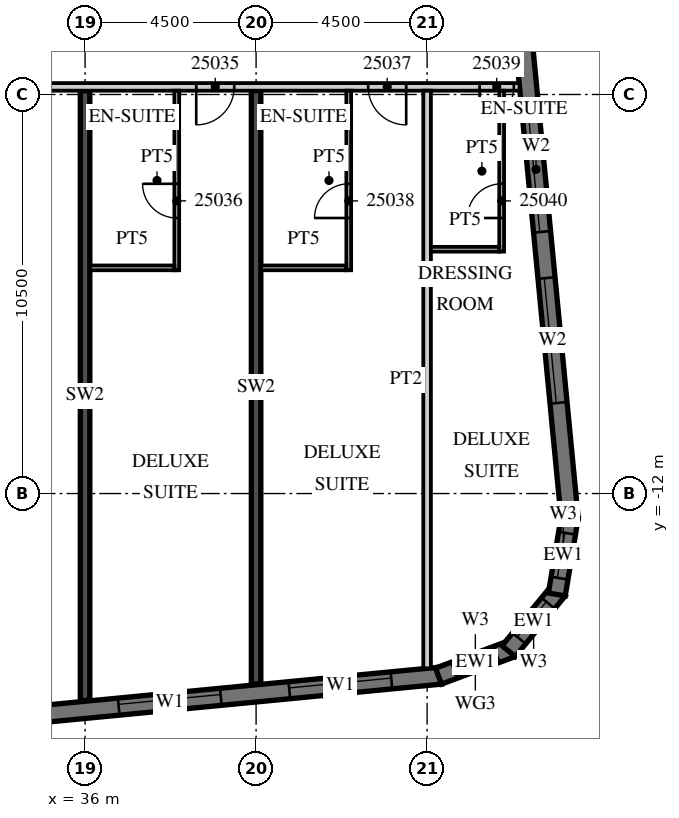
"""IFC4 building model, lengths in metres.
Left out: names, types, materials, properties, quantities, classifications, styles, units other than length and angle.
Written with IfcOpenShell. Run it as: python <this file> out.ifc"""

import sys

from ifc_helpers import new_model, si_unit, direction, frame, frame_2d, origin, place, context, subcontext, project, spatial, polyline, rectangle, outline, extrude, element, fill, save


model = new_model("IFC4")
c1 = context("Model", 3, precision=1e-05, world=origin(), true_north=direction((0.0, 1.0)))
c2 = subcontext(c1, "Body", "Model", "MODEL_VIEW")
j1 = project(units=[si_unit("LENGTHUNIT", "METRE"), si_unit("PLANEANGLEUNIT", "RADIAN")], contexts=[c1])
p1 = place(None, origin())
s1 = spatial("IfcSite", under=j1, at=p1, CompositionType="ELEMENT")
p2 = place(p1, origin())
s2 = spatial("IfcBuilding", under=s1, at=p2, CompositionType="ELEMENT")
p3 = place(p2, frame((0.0, 0.0, 117.4)))
s3 = spatial("IfcBuildingStorey", under=s2, at=p3, CompositionType="ELEMENT", Elevation=117.4)
p4 = place(p3, frame((36.0, -17.444, 0.0), z_axis=(0.0, 0.0, 1.0), x_axis=(0.0, 1.0, 0.0)))
e1 = element("IfcWall", 1, at=p4, inside=s3, PredefinedType="SHEAR", context=c2, shape_type="SweptSolid", body=[
    extrude(rectangle(XDim=16.044, YDim=0.25, at=frame_2d((8.022, 0.0))), origin(), (0.0, 0.0, 1.0), 3.3),
])
p5 = place(p3, frame((40.5, -17.011, 0.0), z_axis=(0.0, 0.0, 1.0), x_axis=(0.0, 1.0, 0.0)))
e2 = element("IfcWall", 2, at=p5, inside=s3, PredefinedType="SHEAR", context=c2, shape_type="SweptSolid", body=[
    extrude(rectangle(XDim=15.611, YDim=0.25, at=frame_2d((7.805, 0.0))), origin(), (0.0, 0.0, 1.0), 3.3),
])
p6 = place(p3, frame((-13.521, -22.46, 0.0), z_axis=(0.0, 0.0, 1.0), x_axis=(0.995396096335, 0.095846812164, 0.0)))
e3 = element("IfcWall", 3, at=p6, inside=s3, PredefinedType="SOLIDWALL", context=c2, shape_type="SweptSolid", body=[
    extrude(rectangle(XDim=59.151, YDim=0.45, at=frame_2d((29.575, 0.0))), origin(), (0.0, 0.0, 1.0), 3.02),
])
p7 = place(p6, frame((0.91, 0.0, 0.45)))
e4 = element("IfcOpeningElement", 4, at=p7, cuts=e3, PredefinedType="OPENING", context=c2, shape_type="SweptSolid", body=[
    extrude(rectangle(XDim=2.7, YDim=2.25, at=frame_2d((1.35, 1.125))), frame((0.0, 0.235, 0.0), z_axis=(0.0, -1.0, 0.0), x_axis=(1.0, 0.0, 0.0)), (0.0, 0.0, 1.0), 0.47),
])
p8 = place(p6, frame((5.431, 0.0, 0.45)))
e5 = element("IfcOpeningElement", 5, at=p8, cuts=e3, PredefinedType="OPENING", context=c2, shape_type="SweptSolid", body=[
    extrude(rectangle(XDim=2.7, YDim=2.25, at=frame_2d((1.35, 1.125))), frame((0.0, 0.235, 0.0), z_axis=(0.0, -1.0, 0.0), x_axis=(1.0, 0.0, 0.0)), (0.0, 0.0, 1.0), 0.47),
])
p9 = place(p6, frame((9.952, 0.0, 0.45)))
e6 = element("IfcOpeningElement", 6, at=p9, cuts=e3, PredefinedType="OPENING", context=c2, shape_type="SweptSolid", body=[
    extrude(rectangle(XDim=2.7, YDim=2.25, at=frame_2d((1.35, 1.125))), frame((0.0, 0.235, 0.0), z_axis=(0.0, -1.0, 0.0), x_axis=(1.0, 0.0, 0.0)), (0.0, 0.0, 1.0), 0.47),
])
p10 = place(p6, frame((14.473, 0.0, 0.45)))
e7 = element("IfcOpeningElement", 7, at=p10, cuts=e3, PredefinedType="OPENING", context=c2, shape_type="SweptSolid", body=[
    extrude(rectangle(XDim=2.7, YDim=2.25, at=frame_2d((1.35, 1.125))), frame((0.0, 0.235, 0.0), z_axis=(0.0, -1.0, 0.0), x_axis=(1.0, 0.0, 0.0)), (0.0, 0.0, 1.0), 0.47),
])
p11 = place(p6, frame((18.994, 0.0, 0.45)))
e8 = element("IfcOpeningElement", 8, at=p11, cuts=e3, PredefinedType="OPENING", context=c2, shape_type="SweptSolid", body=[
    extrude(rectangle(XDim=2.7, YDim=2.25, at=frame_2d((1.35, 1.125))), frame((0.0, 0.235, 0.0), z_axis=(0.0, -1.0, 0.0), x_axis=(1.0, 0.0, 0.0)), (0.0, 0.0, 1.0), 0.47),
])
p12 = place(p6, frame((23.514, 0.0, 0.45)))
e9 = element("IfcOpeningElement", 9, at=p12, cuts=e3, PredefinedType="OPENING", context=c2, shape_type="SweptSolid", body=[
    extrude(rectangle(XDim=2.7, YDim=2.25, at=frame_2d((1.35, 1.125))), frame((0.0, 0.235, 0.0), z_axis=(0.0, -1.0, 0.0), x_axis=(1.0, 0.0, 0.0)), (0.0, 0.0, 1.0), 0.47),
])
p13 = place(p6, frame((28.035, 0.0, 0.45)))
e10 = element("IfcOpeningElement", 10, at=p13, cuts=e3, PredefinedType="OPENING", context=c2, shape_type="SweptSolid", body=[
    extrude(rectangle(XDim=2.7, YDim=2.25, at=frame_2d((1.35, 1.125))), frame((0.0, 0.235, 0.0), z_axis=(0.0, -1.0, 0.0), x_axis=(1.0, 0.0, 0.0)), (0.0, 0.0, 1.0), 0.47),
])
p14 = place(p6, frame((32.556, 0.0, 0.45)))
e11 = element("IfcOpeningElement", 11, at=p14, cuts=e3, PredefinedType="OPENING", context=c2, shape_type="SweptSolid", body=[
    extrude(rectangle(XDim=2.7, YDim=2.25, at=frame_2d((1.35, 1.125))), frame((0.0, 0.235, 0.0), z_axis=(0.0, -1.0, 0.0), x_axis=(1.0, 0.0, 0.0)), (0.0, 0.0, 1.0), 0.47),
])
p15 = place(p6, frame((37.077, 0.0, 0.45)))
e12 = element("IfcOpeningElement", 12, at=p15, cuts=e3, PredefinedType="OPENING", context=c2, shape_type="SweptSolid", body=[
    extrude(rectangle(XDim=2.7, YDim=2.25, at=frame_2d((1.35, 1.125))), frame((0.0, 0.235, 0.0), z_axis=(0.0, -1.0, 0.0), x_axis=(1.0, 0.0, 0.0)), (0.0, 0.0, 1.0), 0.47),
])
p16 = place(p6, frame((41.598, 0.0, 0.45)))
e13 = element("IfcOpeningElement", 13, at=p16, cuts=e3, PredefinedType="OPENING", context=c2, shape_type="SweptSolid", body=[
    extrude(rectangle(XDim=2.7, YDim=2.25, at=frame_2d((1.35, 1.125))), frame((0.0, 0.235, 0.0), z_axis=(0.0, -1.0, 0.0), x_axis=(1.0, 0.0, 0.0)), (0.0, 0.0, 1.0), 0.47),
])
p17 = place(p6, frame((46.118, 0.0, 0.45)))
e14 = element("IfcOpeningElement", 14, at=p17, cuts=e3, PredefinedType="OPENING", context=c2, shape_type="SweptSolid", body=[
    extrude(rectangle(XDim=2.7, YDim=2.25, at=frame_2d((1.35, 1.125))), frame((0.0, 0.235, 0.0), z_axis=(0.0, -1.0, 0.0), x_axis=(1.0, 0.0, 0.0)), (0.0, 0.0, 1.0), 0.47),
])
p18 = place(p6, frame((50.639, 0.0, 0.45)))
e15 = element("IfcOpeningElement", 15, at=p18, cuts=e3, PredefinedType="OPENING", context=c2, shape_type="SweptSolid", body=[
    extrude(rectangle(XDim=2.7, YDim=2.25, at=frame_2d((1.35, 1.125))), frame((0.0, 0.235, 0.0), z_axis=(0.0, -1.0, 0.0), x_axis=(1.0, 0.0, 0.0)), (0.0, 0.0, 1.0), 0.47),
])
p19 = place(p6, frame((55.15, 0.0, 0.45)))
e16 = element("IfcOpeningElement", 16, at=p19, cuts=e3, PredefinedType="OPENING", context=c2, shape_type="SweptSolid", body=[
    extrude(rectangle(XDim=2.7, YDim=2.25, at=frame_2d((1.35, 1.125))), frame((0.0, 0.235, 0.0), z_axis=(0.0, -1.0, 0.0), x_axis=(1.0, 0.0, 0.0)), (0.0, 0.0, 1.0), 0.47),
])
p20 = place(p3, frame((45.3, -16.804, 0.0), z_axis=(0.0, 0.0, 1.0), x_axis=(0.936677599948, 0.350192909346, 0.0)))
e17 = element("IfcWall", 17, at=p20, inside=s3, PredefinedType="SOLIDWALL", context=c2, shape_type="SweptSolid", body=[
    extrude(outline(polyline([(0.0, -0.225), (2.071, -0.225), (1.95, 0.225), (0.121, 0.225), (0.0, -0.225)])), origin(), (0.0, 0.0, 1.0), 3.02),
])
p21 = place(p20, frame((0.435, 0.0, 0.45)))
e18 = element("IfcOpeningElement", 18, at=p21, cuts=e17, PredefinedType="OPENING", context=c2, shape_type="SweptSolid", body=[
    extrude(rectangle(XDim=1.2, YDim=2.25, at=frame_2d((0.6, 1.125))), frame((0.0, 0.235, 0.0), z_axis=(0.0, -1.0, 0.0), x_axis=(1.0, 0.0, 0.0)), (0.0, 0.0, 1.0), 0.47),
])
p22 = place(p3, frame((47.145, -16.147, 0.0), z_axis=(0.0, 0.0, 1.0), x_axis=(0.635988241739, 0.771698747161, 0.0)))
e19 = element("IfcWall", 19, at=p22, inside=s3, PredefinedType="SOLIDWALL", context=c2, shape_type="SweptSolid", body=[
    extrude(outline(polyline([(0.0, -0.225), (2.071, -0.225), (1.95, 0.225), (0.121, 0.225), (0.0, -0.225)])), origin(), (0.0, 0.0, 1.0), 3.02),
])
p23 = place(p22, frame((0.435, 0.0, 0.45)))
e20 = element("IfcOpeningElement", 20, at=p23, cuts=e19, PredefinedType="OPENING", context=c2, shape_type="SweptSolid", body=[
    extrude(rectangle(XDim=1.2, YDim=2.25, at=frame_2d((0.6, 1.125))), frame((0.0, 0.235, 0.0), z_axis=(0.0, -1.0, 0.0), x_axis=(1.0, 0.0, 0.0)), (0.0, 0.0, 1.0), 0.47),
])
p24 = place(p3, frame((48.413, -14.655, 0.0), z_axis=(0.0, 0.0, 1.0), x_axis=(0.165068144653, 0.986282164302, 0.0)))
e21 = element("IfcWall", 21, at=p24, inside=s3, PredefinedType="SOLIDWALL", context=c2, shape_type="SweptSolid", body=[
    extrude(outline(polyline([(0.0, -0.225), (2.071, -0.225), (1.95, 0.225), (0.121, 0.225), (0.0, -0.225)])), origin(), (0.0, 0.0, 1.0), 3.02),
])
p25 = place(p24, frame((0.435, 0.0, 0.45)))
e22 = element("IfcOpeningElement", 22, at=p25, cuts=e21, PredefinedType="OPENING", context=c2, shape_type="SweptSolid", body=[
    extrude(rectangle(XDim=1.2, YDim=2.25, at=frame_2d((0.6, 1.125))), frame((0.0, 0.235, 0.0), z_axis=(0.0, -1.0, 0.0), x_axis=(1.0, 0.0, 0.0)), (0.0, 0.0, 1.0), 0.47),
])
p26 = place(p3, frame((48.753, -12.672, 0.0), z_axis=(0.0, 0.0, 1.0), x_axis=(-0.095842661909, 0.995396495954, 0.0)))
e23 = element("IfcWall", 23, at=p26, inside=s3, PredefinedType="SOLIDWALL", context=c2, shape_type="SweptSolid", body=[
    extrude(rectangle(XDim=35.0, YDim=0.45, at=frame_2d((17.5, 0.0))), origin(), (0.0, 0.0, 1.0), 3.02),
])
p27 = place(p26, frame((3.072, 0.0, 0.45)))
e24 = element("IfcOpeningElement", 24, at=p27, cuts=e23, PredefinedType="OPENING", context=c2, shape_type="SweptSolid", body=[
    extrude(rectangle(XDim=3.3, YDim=2.25, at=frame_2d((1.65, 1.125))), frame((0.0, 0.235, 0.0), z_axis=(0.0, -1.0, 0.0), x_axis=(1.0, 0.0, 0.0)), (0.0, 0.0, 1.0), 0.47),
])
p28 = place(p26, frame((7.593, 0.0, 0.45)))
e25 = element("IfcOpeningElement", 25, at=p28, cuts=e23, PredefinedType="OPENING", context=c2, shape_type="SweptSolid", body=[
    extrude(rectangle(XDim=3.3, YDim=2.25, at=frame_2d((1.65, 1.125))), frame((0.0, 0.235, 0.0), z_axis=(0.0, -1.0, 0.0), x_axis=(1.0, 0.0, 0.0)), (0.0, 0.0, 1.0), 0.47),
])
p29 = place(p3, frame((-13.5, -1.3, 0.0), z_axis=(0.0, 0.0, 1.0), x_axis=(1.0, 0.0, 0.0)))
e26 = element("IfcWall", 26, at=p29, inside=s3, PredefinedType="PARTITIONING", context=c2, shape_type="SweptSolid", body=[
    extrude(rectangle(XDim=60.932, YDim=0.2, at=frame_2d((30.466, 0.0))), origin(), (0.0, 0.0, 1.0), 3.02),
])
p30 = place(p29, frame((0.575, 0.0, 0.0)))
e27 = element("IfcOpeningElement", 27, at=p30, cuts=e26, PredefinedType="OPENING", context=c2, shape_type="SweptSolid", body=[
    extrude(rectangle(XDim=1.0, YDim=2.1, at=frame_2d((0.5, 1.05))), frame((0.0, 0.11, 0.0), z_axis=(0.0, -1.0, 0.0), x_axis=(1.0, 0.0, 0.0)), (0.0, 0.0, 1.0), 0.22),
])
p31 = place(p29, frame((5.075, 0.0, 0.0)))
e28 = element("IfcOpeningElement", 28, at=p31, cuts=e26, PredefinedType="OPENING", context=c2, shape_type="SweptSolid", body=[
    extrude(rectangle(XDim=1.0, YDim=2.1, at=frame_2d((0.5, 1.05))), frame((0.0, 0.11, 0.0), z_axis=(0.0, -1.0, 0.0), x_axis=(1.0, 0.0, 0.0)), (0.0, 0.0, 1.0), 0.22),
])
p32 = place(p29, frame((11.925, 0.0, 0.0)))
e29 = element("IfcOpeningElement", 29, at=p32, cuts=e26, PredefinedType="OPENING", context=c2, shape_type="SweptSolid", body=[
    extrude(rectangle(XDim=1.0, YDim=2.1, at=frame_2d((0.5, 1.05))), frame((0.0, 0.11, 0.0), z_axis=(0.0, -1.0, 0.0), x_axis=(1.0, 0.0, 0.0)), (0.0, 0.0, 1.0), 0.22),
])
p33 = place(p29, frame((15.938, 0.0, 0.0)))
e30 = element("IfcOpeningElement", 30, at=p33, cuts=e26, PredefinedType="OPENING", context=c2, shape_type="SweptSolid", body=[
    extrude(rectangle(XDim=1.2, YDim=2.1, at=frame_2d((0.6, 1.05))), frame((0.0, 0.11, 0.0), z_axis=(0.0, -1.0, 0.0), x_axis=(1.0, 0.0, 0.0)), (0.0, 0.0, 1.0), 0.22),
])
p34 = place(p29, frame((25.45, 0.0, 0.0)))
e31 = element("IfcOpeningElement", 31, at=p34, cuts=e26, PredefinedType="OPENING", context=c2, shape_type="SweptSolid", body=[
    extrude(rectangle(XDim=1.0, YDim=2.1, at=frame_2d((0.5, 1.05))), frame((0.0, 0.11, 0.0), z_axis=(0.0, -1.0, 0.0), x_axis=(1.0, 0.0, 0.0)), (0.0, 0.0, 1.0), 0.22),
])
p35 = place(p29, frame((27.55, 0.0, 0.0)))
e32 = element("IfcOpeningElement", 32, at=p35, cuts=e26, PredefinedType="OPENING", context=c2, shape_type="SweptSolid", body=[
    extrude(rectangle(XDim=1.0, YDim=2.1, at=frame_2d((0.5, 1.05))), frame((0.0, 0.11, 0.0), z_axis=(0.0, -1.0, 0.0), x_axis=(1.0, 0.0, 0.0)), (0.0, 0.0, 1.0), 0.22),
])
p36 = place(p29, frame((33.938, 0.0, 0.0)))
e33 = element("IfcOpeningElement", 33, at=p36, cuts=e26, PredefinedType="OPENING", context=c2, shape_type="SweptSolid", body=[
    extrude(rectangle(XDim=1.2, YDim=2.1, at=frame_2d((0.6, 1.05))), frame((0.0, 0.11, 0.0), z_axis=(0.0, -1.0, 0.0), x_axis=(1.0, 0.0, 0.0)), (0.0, 0.0, 1.0), 0.22),
])
p37 = place(p29, frame((45.862, 0.0, 0.0)))
e34 = element("IfcOpeningElement", 34, at=p37, cuts=e26, PredefinedType="OPENING", context=c2, shape_type="SweptSolid", body=[
    extrude(rectangle(XDim=1.2, YDim=2.1, at=frame_2d((0.6, 1.05))), frame((0.0, 0.11, 0.0), z_axis=(0.0, -1.0, 0.0), x_axis=(1.0, 0.0, 0.0)), (0.0, 0.0, 1.0), 0.22),
])
p38 = place(p29, frame((52.425, 0.0, 0.0)))
e35 = element("IfcOpeningElement", 35, at=p38, cuts=e26, PredefinedType="OPENING", context=c2, shape_type="SweptSolid", body=[
    extrude(rectangle(XDim=1.0, YDim=2.1, at=frame_2d((0.5, 1.05))), frame((0.0, 0.11, 0.0), z_axis=(0.0, -1.0, 0.0), x_axis=(1.0, 0.0, 0.0)), (0.0, 0.0, 1.0), 0.22),
])
p39 = place(p29, frame((56.95, 0.0, 0.0)))
e36 = element("IfcOpeningElement", 36, at=p39, cuts=e26, PredefinedType="OPENING", context=c2, shape_type="SweptSolid", body=[
    extrude(rectangle(XDim=1.0, YDim=2.1, at=frame_2d((0.5, 1.05))), frame((0.0, 0.11, 0.0), z_axis=(0.0, -1.0, 0.0), x_axis=(1.0, 0.0, 0.0)), (0.0, 0.0, 1.0), 0.22),
])
p40 = place(p29, frame((59.882, 0.0, 0.0)))
e37 = element("IfcOpeningElement", 37, at=p40, cuts=e26, PredefinedType="OPENING", context=c2, shape_type="SweptSolid", body=[
    extrude(rectangle(XDim=0.9, YDim=2.1, at=frame_2d((0.45, 1.05))), frame((0.0, 0.11, 0.0), z_axis=(0.0, -1.0, 0.0), x_axis=(1.0, 0.0, 0.0)), (0.0, 0.0, 1.0), 0.22),
])
p41 = place(p3, frame((38.413, -6.125, 0.0), z_axis=(0.0, 0.0, 1.0), x_axis=(0.0, 1.0, 0.0)))
e38 = element("IfcWall", 38, at=p41, inside=s3, PredefinedType="PARTITIONING", context=c2, shape_type="SweptSolid", body=[
    extrude(rectangle(XDim=4.725, YDim=0.125, at=frame_2d((2.363, 0.0))), origin(), (0.0, 0.0, 1.0), 3.02),
])
p42 = place(p41, frame((1.375, 0.0, 0.0)))
e39 = element("IfcOpeningElement", 39, at=p42, cuts=e38, PredefinedType="OPENING", context=c2, shape_type="SweptSolid", body=[
    extrude(rectangle(XDim=0.9, YDim=2.1, at=frame_2d((0.45, 1.05))), frame((0.0, 0.073, 0.0), z_axis=(0.0, -1.0, 0.0), x_axis=(1.0, 0.0, 0.0)), (0.0, 0.0, 1.0), 0.145),
])
p43 = place(p3, frame((36.125, -6.062, 0.0), z_axis=(0.0, 0.0, 1.0), x_axis=(1.0, 0.0, 0.0)))
e40 = element("IfcWall", 40, at=p43, inside=s3, PredefinedType="PARTITIONING", context=c2, shape_type="SweptSolid", body=[
    extrude(rectangle(XDim=2.225, YDim=0.125, at=frame_2d((1.113, 0.0))), origin(), (0.0, 0.0, 1.0), 3.02),
])
p44 = place(p3, frame((45.0, -16.599, 0.0), z_axis=(0.0, 0.0, 1.0), x_axis=(0.0, 1.0, 0.0)))
e41 = element("IfcWall", 41, at=p44, inside=s3, PredefinedType="PARTITIONING", context=c2, shape_type="SweptSolid", body=[
    extrude(rectangle(XDim=15.199, YDim=0.2, at=frame_2d((7.6, 0.0))), origin(), (0.0, 0.0, 1.0), 3.02),
])
p45 = place(p3, frame((42.938, -6.125, 0.0), z_axis=(0.0, 0.0, 1.0), x_axis=(0.0, 1.0, 0.0)))
e42 = element("IfcWall", 42, at=p45, inside=s3, PredefinedType="PARTITIONING", context=c2, shape_type="SweptSolid", body=[
    extrude(rectangle(XDim=4.725, YDim=0.125, at=frame_2d((2.363, 0.0))), origin(), (0.0, 0.0, 1.0), 3.02),
])
p46 = place(p45, frame((1.375, 0.0, 0.0)))
e43 = element("IfcOpeningElement", 43, at=p46, cuts=e42, PredefinedType="OPENING", context=c2, shape_type="SweptSolid", body=[
    extrude(rectangle(XDim=0.9, YDim=2.1, at=frame_2d((0.45, 1.05))), frame((0.0, 0.073, 0.0), z_axis=(0.0, -1.0, 0.0), x_axis=(1.0, 0.0, 0.0)), (0.0, 0.0, 1.0), 0.145),
])
p47 = place(p3, frame((40.625, -6.062, 0.0), z_axis=(0.0, 0.0, 1.0), x_axis=(1.0, 0.0, 0.0)))
e44 = element("IfcWall", 44, at=p47, inside=s3, PredefinedType="PARTITIONING", context=c2, shape_type="SweptSolid", body=[
    extrude(rectangle(XDim=2.25, YDim=0.125, at=frame_2d((1.125, 0.0))), origin(), (0.0, 0.0, 1.0), 3.02),
])
p48 = place(p3, frame((46.962, -5.634, 0.0), z_axis=(0.0, 0.0, 1.0), x_axis=(0.0, 1.0, 0.0)))
e45 = element("IfcWall", 45, at=p48, inside=s3, PredefinedType="PARTITIONING", context=c2, shape_type="SweptSolid", body=[
    extrude(rectangle(XDim=4.234, YDim=0.125, at=frame_2d((2.117, 0.0))), origin(), (0.0, 0.0, 1.0), 3.02),
])
p49 = place(p48, frame((0.884, 0.0, 0.0)))
e46 = element("IfcOpeningElement", 46, at=p49, cuts=e45, PredefinedType="OPENING", context=c2, shape_type="SweptSolid", body=[
    extrude(rectangle(XDim=0.9, YDim=2.1, at=frame_2d((0.45, 1.05))), frame((0.0, 0.073, 0.0), z_axis=(0.0, -1.0, 0.0), x_axis=(1.0, 0.0, 0.0)), (0.0, 0.0, 1.0), 0.145),
])
p50 = place(p3, frame((45.1, -5.572, 0.0), z_axis=(0.0, 0.0, 1.0), x_axis=(1.0, 0.0, 0.0)))
e47 = element("IfcWall", 47, at=p50, inside=s3, PredefinedType="PARTITIONING", context=c2, shape_type="SweptSolid", body=[
    extrude(rectangle(XDim=1.8, YDim=0.125, at=frame_2d((0.9, 0.0))), origin(), (0.0, 0.0, 1.0), 3.02),
])
p51 = place(p18, origin())
e48 = element("IfcWindow", 48, at=p51, inside=s3, PartitioningType="SINGLE_PANEL", PredefinedType="WINDOW", context=c2, shape_type="SweptSolid", body=[
    extrude(rectangle(XDim=2.7, YDim=2.25, at=frame_2d((1.35, 1.125))), frame((0.0, 0.09, 0.0), z_axis=(0.0, -1.0, 0.0), x_axis=(1.0, 0.0, 0.0)), (0.0, 0.0, 1.0), 0.06),
])
fill(e15, e48)
p52 = place(p19, origin())
e49 = element("IfcWindow", 49, at=p52, inside=s3, PartitioningType="SINGLE_PANEL", PredefinedType="WINDOW", context=c2, shape_type="SweptSolid", body=[
    extrude(rectangle(XDim=2.7, YDim=2.25, at=frame_2d((1.35, 1.125))), frame((0.0, 0.09, 0.0), z_axis=(0.0, -1.0, 0.0), x_axis=(1.0, 0.0, 0.0)), (0.0, 0.0, 1.0), 0.06),
])
fill(e16, e49)
p53 = place(p21, origin())
e50 = element("IfcWindow", 50, at=p53, inside=s3, PartitioningType="SINGLE_PANEL", PredefinedType="WINDOW", context=c2, shape_type="SweptSolid", body=[
    extrude(rectangle(XDim=1.2, YDim=2.25, at=frame_2d((0.6, 1.125))), frame((0.0, 0.09, 0.0), z_axis=(0.0, -1.0, 0.0), x_axis=(1.0, 0.0, 0.0)), (0.0, 0.0, 1.0), 0.06),
])
fill(e18, e50)
p54 = place(p23, origin())
e51 = element("IfcWindow", 51, at=p54, inside=s3, PartitioningType="SINGLE_PANEL", PredefinedType="WINDOW", context=c2, shape_type="SweptSolid", body=[
    extrude(rectangle(XDim=1.2, YDim=2.25, at=frame_2d((0.6, 1.125))), frame((0.0, 0.09, 0.0), z_axis=(0.0, -1.0, 0.0), x_axis=(1.0, 0.0, 0.0)), (0.0, 0.0, 1.0), 0.06),
])
fill(e20, e51)
p55 = place(p25, origin())
e52 = element("IfcWindow", 52, at=p55, inside=s3, PartitioningType="SINGLE_PANEL", PredefinedType="WINDOW", context=c2, shape_type="SweptSolid", body=[
    extrude(rectangle(XDim=1.2, YDim=2.25, at=frame_2d((0.6, 1.125))), frame((0.0, 0.09, 0.0), z_axis=(0.0, -1.0, 0.0), x_axis=(1.0, 0.0, 0.0)), (0.0, 0.0, 1.0), 0.06),
])
fill(e22, e52)
p56 = place(p27, origin())
e53 = element("IfcWindow", 53, at=p56, inside=s3, PartitioningType="SINGLE_PANEL", PredefinedType="WINDOW", context=c2, shape_type="SweptSolid", body=[
    extrude(rectangle(XDim=3.3, YDim=2.25, at=frame_2d((1.65, 1.125))), frame((0.0, 0.09, 0.0), z_axis=(0.0, -1.0, 0.0), x_axis=(1.0, 0.0, 0.0)), (0.0, 0.0, 1.0), 0.06),
])
fill(e24, e53)
p57 = place(p28, origin())
e54 = element("IfcWindow", 54, at=p57, inside=s3, PartitioningType="SINGLE_PANEL", PredefinedType="WINDOW", context=c2, shape_type="SweptSolid", body=[
    extrude(rectangle(XDim=3.3, YDim=2.25, at=frame_2d((1.65, 1.125))), frame((0.0, 0.09, 0.0), z_axis=(0.0, -1.0, 0.0), x_axis=(1.0, 0.0, 0.0)), (0.0, 0.0, 1.0), 0.06),
])
fill(e25, e54)
p58 = place(p38, origin())
e55 = element("IfcDoor", 55, at=p58, inside=s3, OperationType="SINGLE_SWING_LEFT", PredefinedType="DOOR", context=c2, shape_type="SweptSolid", body=[
    extrude(rectangle(XDim=1.0, YDim=2.1, at=frame_2d((0.5, 1.05))), frame((0.0, 0.025, 0.0), z_axis=(0.0, -1.0, 0.0), x_axis=(1.0, 0.0, 0.0)), (0.0, 0.0, 1.0), 0.05),
])
fill(e35, e55)
p59 = place(p42, origin())
e56 = element("IfcDoor", 56, at=p59, inside=s3, OperationType="SINGLE_SWING_RIGHT", PredefinedType="DOOR", context=c2, shape_type="SweptSolid", body=[
    extrude(rectangle(XDim=0.9, YDim=2.1, at=frame_2d((0.45, 1.05))), frame((0.0, 0.025, 0.0), z_axis=(0.0, -1.0, 0.0), x_axis=(1.0, 0.0, 0.0)), (0.0, 0.0, 1.0), 0.05),
])
fill(e39, e56)
p60 = place(p39, origin())
e57 = element("IfcDoor", 57, at=p60, inside=s3, OperationType="SINGLE_SWING_RIGHT", PredefinedType="DOOR", context=c2, shape_type="SweptSolid", body=[
    extrude(rectangle(XDim=1.0, YDim=2.1, at=frame_2d((0.5, 1.05))), frame((0.0, 0.025, 0.0), z_axis=(0.0, -1.0, 0.0), x_axis=(1.0, 0.0, 0.0)), (0.0, 0.0, 1.0), 0.05),
])
fill(e36, e57)
p61 = place(p46, origin())
e58 = element("IfcDoor", 58, at=p61, inside=s3, OperationType="SINGLE_SWING_LEFT", PredefinedType="DOOR", context=c2, shape_type="SweptSolid", body=[
    extrude(rectangle(XDim=0.9, YDim=2.1, at=frame_2d((0.45, 1.05))), frame((0.0, 0.025, 0.0), z_axis=(0.0, -1.0, 0.0), x_axis=(1.0, 0.0, 0.0)), (0.0, 0.0, 1.0), 0.05),
])
fill(e43, e58)
p62 = place(p40, origin())
e59 = element("IfcDoor", 59, at=p62, inside=s3, OperationType="SINGLE_SWING_LEFT", PredefinedType="DOOR", context=c2, shape_type="SweptSolid", body=[
    extrude(rectangle(XDim=0.9, YDim=2.1, at=frame_2d((0.45, 1.05))), frame((0.0, 0.025, 0.0), z_axis=(0.0, -1.0, 0.0), x_axis=(1.0, 0.0, 0.0)), (0.0, 0.0, 1.0), 0.05),
])
fill(e37, e59)
p63 = place(p49, origin())
e60 = element("IfcDoor", 60, at=p63, inside=s3, OperationType="SINGLE_SWING_LEFT", PredefinedType="DOOR", context=c2, shape_type="SweptSolid", body=[
    extrude(rectangle(XDim=0.9, YDim=2.1, at=frame_2d((0.45, 1.05))), frame((0.0, 0.025, 0.0), z_axis=(0.0, -1.0, 0.0), x_axis=(1.0, 0.0, 0.0)), (0.0, 0.0, 1.0), 0.05),
])
fill(e46, e60)
save(model, sys.argv[1])
